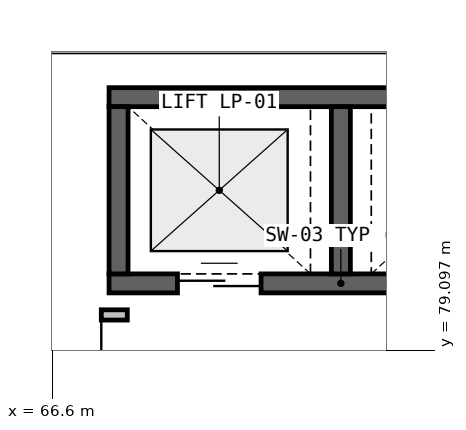
"""IFC4 building model, lengths in metres.
Left out: names, types, materials, properties, quantities, classifications, styles, units other than length and angle.
Written with IfcOpenShell. Run it as: python <this file> out.ifc"""

import sys

from ifc_helpers import new_model, si_unit, direction, frame, frame_2d, origin, place, context, subcontext, project, spatial, rectangle, extrude, element, fill, save


model = new_model("IFC4")
c1 = context("Model", 3, precision=1e-05, world=origin(), true_north=direction((0.0, 1.0)))
c2 = subcontext(c1, "Body", "Model", "MODEL_VIEW")
j1 = project(units=[si_unit("LENGTHUNIT", "METRE"), si_unit("PLANEANGLEUNIT", "RADIAN")], contexts=[c1])
p1 = place(None, origin())
s1 = spatial("IfcSite", under=j1, at=p1, CompositionType="ELEMENT")
p2 = place(p1, origin())
s2 = spatial("IfcBuilding", under=s1, at=p2, CompositionType="ELEMENT")
p3 = place(p2, origin())
s3 = spatial("IfcBuildingStorey", under=s2, at=p3, CompositionType="ELEMENT", Elevation=0.0)
p4 = place(p3, frame((67.35, 79.975, 0.0), z_axis=(0.0, 0.0, 1.0), x_axis=(1.0, 0.0, 0.0)))
e1 = element("IfcWall", 1, at=p4, inside=s3, PredefinedType="SHEAR", context=c2, shape_type="SweptSolid", body=[
    extrude(rectangle(XDim=6.1, YDim=0.25, at=frame_2d((3.05, 0.0))), origin(), (0.0, 0.0, 1.0), 5.08),
])
p5 = place(p4, frame((0.9, 0.0, 0.0)))
e2 = element("IfcOpeningElement", 2, at=p5, cuts=e1, PredefinedType="OPENING", context=c2, shape_type="SweptSolid", body=[
    extrude(rectangle(XDim=1.1, YDim=2.15, at=frame_2d((0.55, 1.075))), frame((0.0, 0.135, 0.0), z_axis=(0.0, -1.0, 0.0), x_axis=(1.0, 0.0, 0.0)), (0.0, 0.0, 1.0), 0.27),
])
p6 = place(p4, frame((4.1, 0.0, 0.0)))
e3 = element("IfcOpeningElement", 3, at=p6, cuts=e1, PredefinedType="OPENING", context=c2, shape_type="SweptSolid", body=[
    extrude(rectangle(XDim=1.1, YDim=2.15, at=frame_2d((0.55, 1.075))), frame((0.0, 0.135, 0.0), z_axis=(0.0, -1.0, 0.0), x_axis=(1.0, 0.0, 0.0)), (0.0, 0.0, 1.0), 0.27),
])
p7 = place(p3, frame((73.45, 82.425, 0.0), z_axis=(0.0, 0.0, 1.0), x_axis=(-1.0, 0.0, 0.0)))
e4 = element("IfcWall", 4, at=p7, inside=s3, PredefinedType="SHEAR", context=c2, shape_type="SweptSolid", body=[
    extrude(rectangle(XDim=6.1, YDim=0.25, at=frame_2d((3.05, 0.0))), origin(), (0.0, 0.0, 1.0), 5.08),
])
for number, where, z_axis, x_axis in (
    (5, (67.475, 82.3, 0.0), (0.0, 0.0, 1.0), (0.0, -1.0, 0.0)),
    (6, (70.4, 80.1, 0.0), (0.0, 0.0, 1.0), (0.0, 1.0, 0.0)),
):
    element("IfcWall", number, at=place(p3, frame(where, z_axis=z_axis, x_axis=x_axis)), inside=s3, PredefinedType="SHEAR", context=c2, shape_type="SweptSolid", body=[
        extrude(rectangle(XDim=2.2, YDim=0.25, at=frame_2d((1.1, 0.0))), origin(), (0.0, 0.0, 1.0), 5.08),
    ])
p8 = place(p3, frame((67.59, 79.56, 0.0), z_axis=(0.0, 0.0, 1.0), x_axis=(-1.0, 0.0, 0.0)))
e7 = element("IfcWall", 7, at=p8, inside=s3, PredefinedType="PARTITIONING", context=c2, shape_type="SweptSolid", body=[
    extrude(rectangle(XDim=1.683, YDim=0.135, at=frame_2d((0.842, 0.0))), origin(), (0.0, 0.0, 1.0), 5.08),
])
p9 = place(p8, frame((0.342, 0.0, 0.0)))
e8 = element("IfcOpeningElement", 8, at=p9, cuts=e7, PredefinedType="OPENING", context=c2, shape_type="SweptSolid", body=[
    extrude(rectangle(XDim=1.0, YDim=2.15, at=frame_2d((0.5, 1.075))), frame((0.0, 0.077, 0.0), z_axis=(0.0, -1.0, 0.0), x_axis=(1.0, 0.0, 0.0)), (0.0, 0.0, 1.0), 0.155),
])
p10 = place(p5, origin())
e9 = element("IfcDoor", 9, at=p10, inside=s3, OperationType="DOUBLE_DOOR_SLIDING", PredefinedType="DOOR", context=c2, shape_type="SweptSolid", body=[
    extrude(rectangle(XDim=1.1, YDim=2.15, at=frame_2d((0.55, 1.075))), frame((0.0, 0.025, 0.0), z_axis=(0.0, -1.0, 0.0), x_axis=(1.0, 0.0, 0.0)), (0.0, 0.0, 1.0), 0.05),
])
fill(e2, e9)
p11 = place(p9, origin())
e10 = element("IfcDoor", 10, at=p11, inside=s3, OperationType="SINGLE_SWING_RIGHT", PredefinedType="DOOR", context=c2, shape_type="SweptSolid", body=[
    extrude(rectangle(XDim=1.0, YDim=2.15, at=frame_2d((0.5, 1.075))), frame((0.0, 0.025, 0.0), z_axis=(0.0, -1.0, 0.0), x_axis=(1.0, 0.0, 0.0)), (0.0, 0.0, 1.0), 0.05),
])
fill(e8, e10)
save(model, sys.argv[1])
